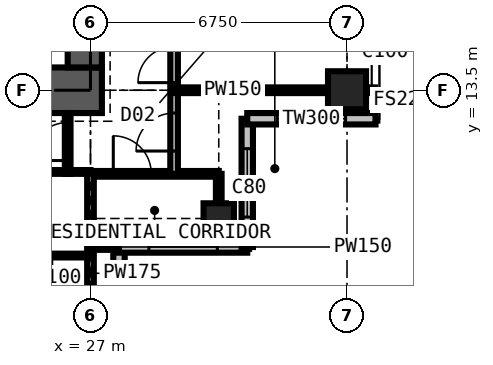
"""IFC4 building model, lengths in metres.
Left out: names, types, materials, properties, quantities, classifications, styles, units other than length and angle.
Written with IfcOpenShell. Run it as: python <this file> out.ifc"""

import sys

from ifc_helpers import new_model, si_unit, direction, frame, frame_2d, origin, origin_2d, place, context, subcontext, project, spatial, rectangle, extrude, element, fill, save


model = new_model("IFC4")
c1 = context("Model", 3, precision=1e-05, world=origin(), true_north=direction((0.0, 1.0)))
c2 = subcontext(c1, "Body", "Model", "MODEL_VIEW")
j1 = project(units=[si_unit("LENGTHUNIT", "METRE"), si_unit("PLANEANGLEUNIT", "RADIAN")], contexts=[c1])
p1 = place(None, origin())
s1 = spatial("IfcSite", under=j1, at=p1, CompositionType="ELEMENT")
p2 = place(p1, origin())
s2 = spatial("IfcBuilding", under=s1, at=p2, CompositionType="ELEMENT")
p3 = place(p2, frame((0.0, 0.0, 247.5)))
s3 = spatial("IfcBuildingStorey", under=s2, at=p3, CompositionType="ELEMENT", Elevation=247.5)
p4 = place(p3, frame((30.375, 10.125, 0.0), z_axis=(0.0, 0.0, 1.0), x_axis=(1.0, 0.0, 0.0)))
e1 = element("IfcColumn", 1, at=p4, inside=s3, PredefinedType="COLUMN", context=c2, shape_type="SweptSolid", body=[
    extrude(rectangle(XDim=0.8, YDim=0.8, at=origin_2d()), origin(), (0.0, 0.0, 1.0), 3.6),
])
p5 = place(p3, frame((33.75, 13.5, 0.0), z_axis=(0.0, 0.0, 1.0), x_axis=(1.0, 0.0, 0.0)))
e2 = element("IfcColumn", 2, at=p5, inside=s3, PredefinedType="COLUMN", context=c2, shape_type="SweptSolid", body=[
    extrude(rectangle(XDim=1.0, YDim=1.0, at=origin_2d()), origin(), (0.0, 0.0, 1.0), 3.6),
])
p6 = place(p3, frame((13.2, 13.5, 0.0), z_axis=(0.0, 0.0, 1.0), x_axis=(1.0, 0.0, 0.0)))
e3 = element("IfcWall", 3, at=p6, inside=s3, PredefinedType="SHEAR", context=c2, shape_type="SweptSolid", body=[
    extrude(rectangle(XDim=14.1, YDim=1.2, at=frame_2d((7.05, 0.0))), origin(), (0.0, 0.0, 1.0), 3.6),
])
p7 = place(p3, frame((26.85, 14.1, 0.0), z_axis=(0.0, 0.0, 1.0), x_axis=(0.0, 1.0, 0.0)))
e4 = element("IfcWall", 4, at=p7, inside=s3, PredefinedType="SHEAR", context=c2, shape_type="SweptSolid", body=[
    extrude(rectangle(XDim=12.3, YDim=0.9, at=frame_2d((6.15, 0.0))), origin(), (0.0, 0.0, 1.0), 3.6),
])
p8 = place(p7, frame((3.65, 0.0, 0.0)))
e5 = element("IfcOpeningElement", 5, at=p8, cuts=e4, PredefinedType="OPENING", context=c2, shape_type="SweptSolid", body=[
    extrude(rectangle(XDim=1.2, YDim=2.2, at=frame_2d((0.6, 1.1))), frame((0.0, 0.46, 0.0), z_axis=(0.0, -1.0, 0.0), x_axis=(1.0, 0.0, 0.0)), (0.0, 0.0, 1.0), 0.92),
])
p9 = place(p3, frame((27.75, 6.0, 0.0), z_axis=(0.0, 0.0, 1.0), x_axis=(0.0, 1.0, 0.0)))
e6 = element("IfcWall", 6, at=p9, inside=s3, PredefinedType="SOLIDWALL", context=c2, shape_type="SweptSolid", body=[
    extrude(rectangle(XDim=3.375, YDim=0.3, at=frame_2d((1.688, 0.0))), origin(), (0.0, 0.0, 1.0), 3.375),
])
p10 = place(p9, frame((0.788, 0.0, 0.6)))
e7 = element("IfcOpeningElement", 7, at=p10, cuts=e6, PredefinedType="OPENING", context=c2, shape_type="SweptSolid", body=[
    extrude(rectangle(XDim=1.8, YDim=2.1, at=frame_2d((0.9, 1.05))), frame((0.0, 0.16, 0.0), z_axis=(0.0, -1.0, 0.0), x_axis=(1.0, 0.0, 0.0)), (0.0, 0.0, 1.0), 0.32),
])
p11 = place(p3, frame((27.75, 9.375, 0.0), z_axis=(0.0, 0.0, 1.0), x_axis=(1.0, 0.0, 0.0)))
e8 = element("IfcWall", 8, at=p11, inside=s3, PredefinedType="SOLIDWALL", context=c2, shape_type="SweptSolid", body=[
    extrude(rectangle(XDim=3.375, YDim=0.3, at=frame_2d((1.688, 0.0))), origin(), (0.0, 0.0, 1.0), 3.375),
])
p12 = place(p11, frame((0.788, 0.0, 0.6)))
e9 = element("IfcOpeningElement", 9, at=p12, cuts=e8, PredefinedType="OPENING", context=c2, shape_type="SweptSolid", body=[
    extrude(rectangle(XDim=1.8, YDim=2.1, at=frame_2d((0.9, 1.05))), frame((0.0, 0.16, 0.0), z_axis=(0.0, -1.0, 0.0), x_axis=(1.0, 0.0, 0.0)), (0.0, 0.0, 1.0), 0.32),
])
p13 = place(p3, frame((31.125, 9.375, 0.0), z_axis=(0.0, 0.0, 1.0), x_axis=(0.0, 1.0, 0.0)))
e10 = element("IfcWall", 10, at=p13, inside=s3, PredefinedType="SOLIDWALL", context=c2, shape_type="SweptSolid", body=[
    extrude(rectangle(XDim=3.375, YDim=0.3, at=frame_2d((1.688, 0.0))), origin(), (0.0, 0.0, 1.0), 3.375),
])
p14 = place(p13, frame((0.788, 0.0, 0.6)))
e11 = element("IfcOpeningElement", 11, at=p14, cuts=e10, PredefinedType="OPENING", context=c2, shape_type="SweptSolid", body=[
    extrude(rectangle(XDim=1.8, YDim=2.1, at=frame_2d((0.9, 1.05))), frame((0.0, 0.16, 0.0), z_axis=(0.0, -1.0, 0.0), x_axis=(1.0, 0.0, 0.0)), (0.0, 0.0, 1.0), 0.32),
])
p15 = place(p3, frame((31.125, 12.75, 0.0), z_axis=(0.0, 0.0, 1.0), x_axis=(1.0, 0.0, 0.0)))
e12 = element("IfcWall", 12, at=p15, inside=s3, PredefinedType="SOLIDWALL", context=c2, shape_type="SweptSolid", body=[
    extrude(rectangle(XDim=3.375, YDim=0.3, at=frame_2d((1.688, 0.0))), origin(), (0.0, 0.0, 1.0), 3.375),
])
p16 = place(p15, frame((0.788, 0.0, 0.6)))
e13 = element("IfcOpeningElement", 13, at=p16, cuts=e12, PredefinedType="OPENING", context=c2, shape_type="SweptSolid", body=[
    extrude(rectangle(XDim=1.8, YDim=2.1, at=frame_2d((0.9, 1.05))), frame((0.0, 0.16, 0.0), z_axis=(0.0, -1.0, 0.0), x_axis=(1.0, 0.0, 0.0)), (0.0, 0.0, 1.0), 0.32),
])
p17 = place(p3, frame((23.625, 11.35, 0.0), z_axis=(0.0, 0.0, 1.0), x_axis=(1.0, 0.0, 0.0)))
e14 = element("IfcWall", 14, at=p17, inside=s3, PredefinedType="PARTITIONING", context=c2, shape_type="SweptSolid", body=[
    extrude(rectangle(XDim=3.375, YDim=0.1, at=frame_2d((1.688, 0.0))), origin(), (0.0, 0.0, 1.0), 3.375),
])
p18 = place(p17, frame((0.2, 0.0, 0.0)))
e15 = element("IfcOpeningElement", 15, at=p18, cuts=e14, PredefinedType="OPENING", context=c2, shape_type="SweptSolid", body=[
    extrude(rectangle(XDim=0.95, YDim=2.2, at=frame_2d((0.475, 1.1))), frame((0.0, 0.06, 0.0), z_axis=(0.0, -1.0, 0.0), x_axis=(1.0, 0.0, 0.0)), (0.0, 0.0, 1.0), 0.12),
])
p19 = place(p3, frame((25.0, 9.15, 0.0), z_axis=(0.0, 0.0, 1.0), x_axis=(1.0, 0.0, 0.0)))
e16 = element("IfcWall", 16, at=p19, inside=s3, PredefinedType="PARTITIONING", context=c2, shape_type="SweptSolid", body=[
    extrude(rectangle(XDim=2.0, YDim=0.1, at=frame_2d((1.0, 0.0))), origin(), (0.0, 0.0, 1.0), 3.375),
])
p20 = place(p3, frame((26.4, 11.3, 0.0), z_axis=(0.0, 0.0, 1.0), x_axis=(0.0, 1.0, 0.0)))
e17 = element("IfcWall", 17, at=p20, inside=s3, PredefinedType="PARTITIONING", context=c2, shape_type="SweptSolid", body=[
    extrude(rectangle(XDim=1.6, YDim=0.15, at=frame_2d((0.8, 0.0))), origin(), (0.0, 0.0, 1.0), 3.375),
])
p21 = place(p20, frame((0.35, 0.0, 0.0)))
e18 = element("IfcOpeningElement", 18, at=p21, cuts=e17, PredefinedType="OPENING", context=c2, shape_type="SweptSolid", body=[
    extrude(rectangle(XDim=1.0, YDim=2.2, at=frame_2d((0.5, 1.1))), frame((0.0, 0.085, 0.0), z_axis=(0.0, -1.0, 0.0), x_axis=(1.0, 0.0, 0.0)), (0.0, 0.0, 1.0), 0.17),
])
p22 = place(p3, frame((27.0, 11.3, 0.0), z_axis=(0.0, 0.0, 1.0), x_axis=(1.0, 0.0, 0.0)))
e19 = element("IfcWall", 19, at=p22, inside=s3, PredefinedType="PARTITIONING", context=c2, shape_type="SweptSolid", body=[
    extrude(rectangle(XDim=3.375, YDim=0.15, at=frame_2d((1.688, 0.0))), origin(), (0.0, 0.0, 1.0), 3.375),
])
p23 = place(p22, frame((0.6, 0.0, 0.0)))
e20 = element("IfcOpeningElement", 20, at=p23, cuts=e19, PredefinedType="OPENING", context=c2, shape_type="SweptSolid", body=[
    extrude(rectangle(XDim=1.0, YDim=2.2, at=frame_2d((0.5, 1.1))), frame((0.0, 0.085, 0.0), z_axis=(0.0, -1.0, 0.0), x_axis=(1.0, 0.0, 0.0)), (0.0, 0.0, 1.0), 0.17),
])
p24 = place(p3, frame((27.0, 6.016, 0.0), z_axis=(0.0, 0.0, 1.0), x_axis=(0.0, 1.0, 0.0)))
e21 = element("IfcWall", 21, at=p24, inside=s3, PredefinedType="PARTITIONING", context=c2, shape_type="SweptSolid", body=[
    extrude(rectangle(XDim=5.334, YDim=0.175, at=frame_2d((2.667, 0.0))), origin(), (0.0, 0.0, 1.0), 2.877),
])
p25 = place(p3, frame((27.0, 9.375, 0.0), z_axis=(0.0, 0.0, 1.0), x_axis=(1.0, 0.0, 0.0)))
e22 = element("IfcWall", 22, at=p25, inside=s3, PredefinedType="PARTITIONING", context=c2, shape_type="SweptSolid", body=[
    extrude(rectangle(XDim=0.734, YDim=0.15, at=frame_2d((0.367, 0.0))), origin(), (0.0, 0.0, 1.0), 3.375),
])
p26 = place(p3, frame((29.2, 11.3, 0.0), z_axis=(0.0, 0.0, 1.0), x_axis=(0.0, 1.0, 0.0)))
e23 = element("IfcWall", 23, at=p26, inside=s3, PredefinedType="PARTITIONING", context=c2, shape_type="SweptSolid", body=[
    extrude(rectangle(XDim=17.9, YDim=0.2, at=frame_2d((8.95, 0.0))), origin(), (0.0, 0.0, 1.0), 3.375),
])
p27 = place(p26, frame((0.6, 0.0, 0.0)))
e24 = element("IfcOpeningElement", 24, at=p27, cuts=e23, PredefinedType="OPENING", context=c2, shape_type="SweptSolid", body=[
    extrude(rectangle(XDim=1.0, YDim=2.2, at=frame_2d((0.5, 1.1))), frame((0.0, 0.11, 0.0), z_axis=(0.0, -1.0, 0.0), x_axis=(1.0, 0.0, 0.0)), (0.0, 0.0, 1.0), 0.22),
])
p28 = place(p26, frame((2.4, 0.0, 0.0)))
e25 = element("IfcOpeningElement", 25, at=p28, cuts=e23, PredefinedType="OPENING", context=c2, shape_type="SweptSolid", body=[
    extrude(rectangle(XDim=0.95, YDim=2.2, at=frame_2d((0.475, 1.1))), frame((0.0, 0.11, 0.0), z_axis=(0.0, -1.0, 0.0), x_axis=(1.0, 0.0, 0.0)), (0.0, 0.0, 1.0), 0.22),
])
p29 = place(p26, frame((5.825, 0.0, 0.0)))
e26 = element("IfcOpeningElement", 26, at=p29, cuts=e23, PredefinedType="OPENING", context=c2, shape_type="SweptSolid", body=[
    extrude(rectangle(XDim=0.95, YDim=2.2, at=frame_2d((0.475, 1.1))), frame((0.0, 0.11, 0.0), z_axis=(0.0, -1.0, 0.0), x_axis=(1.0, 0.0, 0.0)), (0.0, 0.0, 1.0), 0.22),
])
p30 = place(p26, frame((9.2, 0.0, 0.0)))
e27 = element("IfcOpeningElement", 27, at=p30, cuts=e23, PredefinedType="OPENING", context=c2, shape_type="SweptSolid", body=[
    extrude(rectangle(XDim=0.95, YDim=2.2, at=frame_2d((0.475, 1.1))), frame((0.0, 0.11, 0.0), z_axis=(0.0, -1.0, 0.0), x_axis=(1.0, 0.0, 0.0)), (0.0, 0.0, 1.0), 0.22),
])
p31 = place(p26, frame((12.575, 0.0, 0.0)))
e28 = element("IfcOpeningElement", 28, at=p31, cuts=e23, PredefinedType="OPENING", context=c2, shape_type="SweptSolid", body=[
    extrude(rectangle(XDim=0.95, YDim=2.2, at=frame_2d((0.475, 1.1))), frame((0.0, 0.11, 0.0), z_axis=(0.0, -1.0, 0.0), x_axis=(1.0, 0.0, 0.0)), (0.0, 0.0, 1.0), 0.22),
])
p32 = place(p26, frame((16.3, 0.0, 0.0)))
e29 = element("IfcOpeningElement", 29, at=p32, cuts=e23, PredefinedType="OPENING", context=c2, shape_type="SweptSolid", body=[
    extrude(rectangle(XDim=1.0, YDim=2.2, at=frame_2d((0.5, 1.1))), frame((0.0, 0.11, 0.0), z_axis=(0.0, -1.0, 0.0), x_axis=(1.0, 0.0, 0.0)), (0.0, 0.0, 1.0), 0.22),
])
p33 = place(p3, frame((29.2, 13.5, 0.0), z_axis=(0.0, 0.0, 1.0), x_axis=(1.0, 0.0, 0.0)))
e30 = element("IfcWall", 30, at=p33, inside=s3, PredefinedType="PARTITIONING", context=c2, shape_type="SweptSolid", body=[
    extrude(rectangle(XDim=5.284, YDim=0.15, at=frame_2d((2.642, 0.0))), origin(), (0.0, 0.0, 1.0), 2.877),
])
p34 = place(p3, frame((30.375, 9.525, 0.0), z_axis=(0.0, 0.0, 1.0), x_axis=(0.0, 1.0, 0.0)))
e31 = element("IfcWall", 31, at=p34, inside=s3, PredefinedType="PARTITIONING", context=c2, shape_type="SweptSolid", body=[
    extrude(rectangle(XDim=1.775, YDim=0.15, at=frame_2d((0.888, 0.0))), origin(), (0.0, 0.0, 1.0), 2.877),
])
p35 = place(p10, origin())
e32 = element("IfcWindow", 32, at=p35, inside=s3, PartitioningType="SINGLE_PANEL", PredefinedType="WINDOW", context=c2, shape_type="SweptSolid", body=[
    extrude(rectangle(XDim=1.8, YDim=2.1, at=frame_2d((0.9, 1.05))), frame((0.0, 0.03, 0.0), z_axis=(0.0, -1.0, 0.0), x_axis=(1.0, 0.0, 0.0)), (0.0, 0.0, 1.0), 0.06),
])
fill(e7, e32)
p36 = place(p12, origin())
e33 = element("IfcWindow", 33, at=p36, inside=s3, PartitioningType="SINGLE_PANEL", PredefinedType="WINDOW", context=c2, shape_type="SweptSolid", body=[
    extrude(rectangle(XDim=1.8, YDim=2.1, at=frame_2d((0.9, 1.05))), frame((0.0, 0.03, 0.0), z_axis=(0.0, -1.0, 0.0), x_axis=(1.0, 0.0, 0.0)), (0.0, 0.0, 1.0), 0.06),
])
fill(e9, e33)
p37 = place(p14, origin())
e34 = element("IfcWindow", 34, at=p37, inside=s3, PartitioningType="SINGLE_PANEL", PredefinedType="WINDOW", context=c2, shape_type="SweptSolid", body=[
    extrude(rectangle(XDim=1.8, YDim=2.1, at=frame_2d((0.9, 1.05))), frame((0.0, 0.03, 0.0), z_axis=(0.0, -1.0, 0.0), x_axis=(1.0, 0.0, 0.0)), (0.0, 0.0, 1.0), 0.06),
])
fill(e11, e34)
p38 = place(p16, origin())
e35 = element("IfcWindow", 35, at=p38, inside=s3, PartitioningType="SINGLE_PANEL", PredefinedType="WINDOW", context=c2, shape_type="SweptSolid", body=[
    extrude(rectangle(XDim=1.8, YDim=2.1, at=frame_2d((0.9, 1.05))), frame((0.0, 0.03, 0.0), z_axis=(0.0, -1.0, 0.0), x_axis=(1.0, 0.0, 0.0)), (0.0, 0.0, 1.0), 0.06),
])
fill(e13, e35)
p39 = place(p23, origin())
e36 = element("IfcDoor", 36, at=p39, inside=s3, OperationType="SINGLE_SWING_LEFT", PredefinedType="DOOR", context=c2, shape_type="SweptSolid", body=[
    extrude(rectangle(XDim=1.0, YDim=2.2, at=frame_2d((0.5, 1.1))), frame((0.0, 0.025, 0.0), z_axis=(0.0, -1.0, 0.0), x_axis=(1.0, 0.0, 0.0)), (0.0, 0.0, 1.0), 0.05),
])
fill(e20, e36)
p40 = place(p21, origin())
e37 = element("IfcDoor", 37, at=p40, inside=s3, OperationType="SINGLE_SWING_LEFT", PredefinedType="DOOR", context=c2, shape_type="SweptSolid", body=[
    extrude(rectangle(XDim=1.0, YDim=2.2, at=frame_2d((0.5, 1.1))), frame((0.0, 0.025, 0.0), z_axis=(0.0, -1.0, 0.0), x_axis=(1.0, 0.0, 0.0)), (0.0, 0.0, 1.0), 0.05),
])
fill(e18, e37)
p41 = place(p27, origin())
e38 = element("IfcDoor", 38, at=p41, inside=s3, OperationType="SINGLE_SWING_LEFT", PredefinedType="DOOR", context=c2, shape_type="SweptSolid", body=[
    extrude(rectangle(XDim=1.0, YDim=2.2, at=frame_2d((0.5, 1.1))), frame((0.0, 0.025, 0.0), z_axis=(0.0, -1.0, 0.0), x_axis=(1.0, 0.0, 0.0)), (0.0, 0.0, 1.0), 0.05),
])
fill(e24, e38)
p42 = place(p28, origin())
e39 = element("IfcDoor", 39, at=p42, inside=s3, OperationType="SINGLE_SWING_LEFT", PredefinedType="DOOR", context=c2, shape_type="SweptSolid", body=[
    extrude(rectangle(XDim=0.95, YDim=2.2, at=frame_2d((0.475, 1.1))), frame((0.0, 0.025, 0.0), z_axis=(0.0, -1.0, 0.0), x_axis=(1.0, 0.0, 0.0)), (0.0, 0.0, 1.0), 0.05),
])
fill(e25, e39)
save(model, sys.argv[1])
